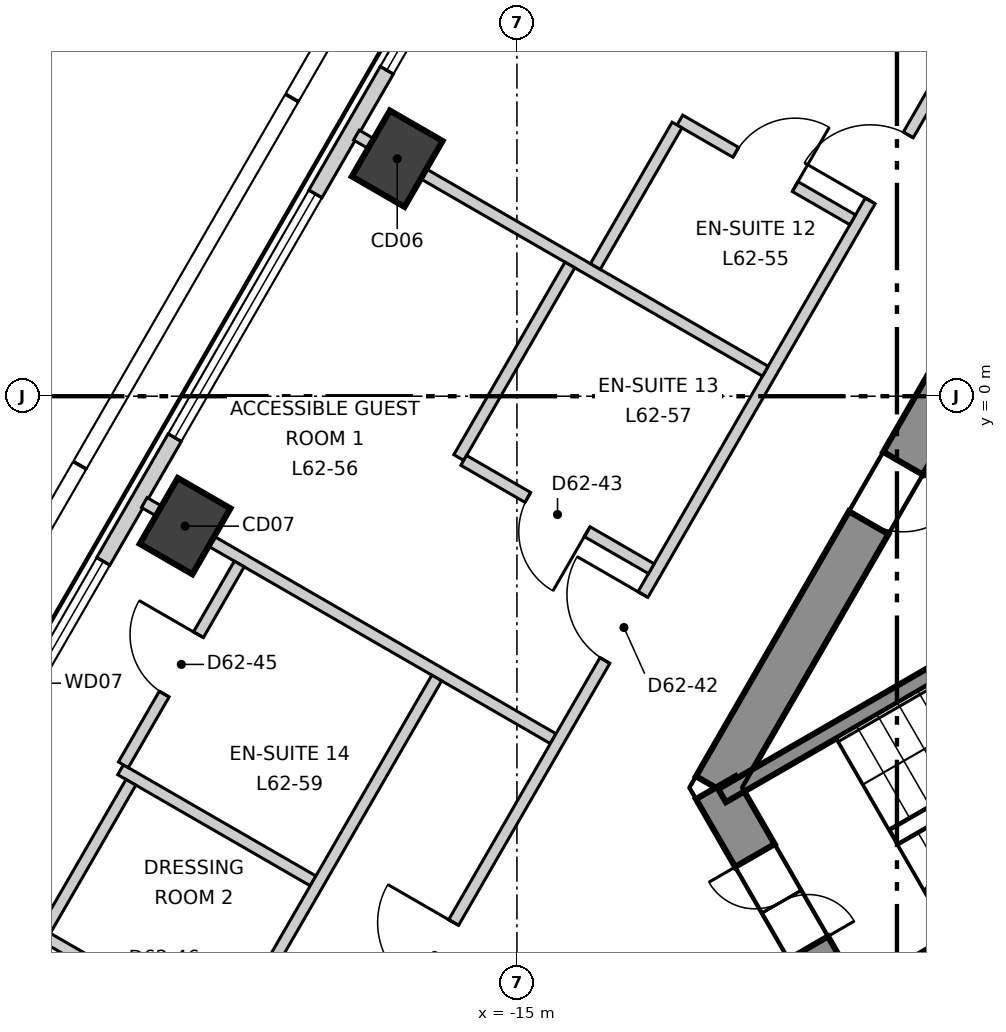
"""IFC4 building model, lengths in metres.
Left out: names, types, materials, properties, quantities, classifications, styles, units other than length and angle.
Written with IfcOpenShell. Run it as: python <this file> out.ifc"""

import sys

from ifc_helpers import new_model, si_unit, direction, frame, frame_2d, origin, origin_2d, place, context, subcontext, project, spatial, polyline, rectangle, outline, extrude, element, fill, save


model = new_model("IFC4")
c1 = context("Model", 3, precision=1e-05, world=origin(), true_north=direction((0.0, 1.0)))
c2 = subcontext(c1, "Body", "Model", "MODEL_VIEW")
j1 = project(units=[si_unit("LENGTHUNIT", "METRE"), si_unit("PLANEANGLEUNIT", "RADIAN")], contexts=[c1])
p1 = place(None, origin())
s1 = spatial("IfcSite", under=j1, at=p1, CompositionType="ELEMENT")
p2 = place(p1, origin())
s2 = spatial("IfcBuilding", under=s1, at=p2, CompositionType="ELEMENT")
p3 = place(p2, frame((0.0, 0.0, 268.3)))
s3 = spatial("IfcBuildingStorey", under=s2, at=p3, CompositionType="ELEMENT", Elevation=268.3)
p4 = place(p3, frame((-1.732, 13.3, -0.3), z_axis=(0.0, 0.0, 1.0), x_axis=(-0.500000539815, -0.866025092122, 0.0)))
e1 = element("IfcWall", 1, at=p4, inside=s3, PredefinedType="SHEAR", context=c2, shape_type="SweptSolid", body=[
    extrude(outline(polyline([(-0.173, -0.3), (1.795, -0.3), (3.763, -0.3), (5.732, -0.3), (7.7, -0.3), (9.668, -0.301), (11.637, -0.301), (13.605, -0.301), (15.573, -0.301), (17.542, -0.301), (19.51, -0.301), (21.478, -0.301), (21.131, 0.3), (19.226, 0.3), (17.321, 0.3), (15.415, 0.3), (13.51, 0.3), (11.605, 0.3), (9.699, 0.3), (7.794, 0.3), (5.889, 0.3), (3.984, 0.3), (2.078, 0.3), (0.173, 0.3), (-0.173, -0.3)])), origin(), (0.0, 0.0, 1.0), 3.6),
])
p5 = place(p4, frame((10.102, 0.0, 0.3)))
e2 = element("IfcOpeningElement", 2, at=p5, cuts=e1, PredefinedType="OPENING", context=c2, shape_type="SweptSolid", body=[
    extrude(rectangle(XDim=1.1, YDim=2.1, at=frame_2d((0.55, 1.05))), frame((0.0, 0.31, 0.0), z_axis=(0.0, -1.0, 0.0), x_axis=(1.0, 0.0, 0.0)), (0.0, 0.0, 1.0), 0.621),
])
p6 = place(p4, frame((16.378, 0.0, 0.3)))
e3 = element("IfcOpeningElement", 3, at=p6, cuts=e1, PredefinedType="OPENING", context=c2, shape_type="SweptSolid", body=[
    extrude(rectangle(XDim=0.9, YDim=2.1, at=frame_2d((0.45, 1.05))), frame((0.0, 0.31, 0.0), z_axis=(0.0, -1.0, 0.0), x_axis=(1.0, 0.0, 0.0)), (0.0, 0.0, 1.0), 0.621),
])
p7 = place(p4, frame((4.026, 0.0, 0.3)))
e4 = element("IfcOpeningElement", 4, at=p7, cuts=e1, PredefinedType="OPENING", context=c2, shape_type="SweptSolid", body=[
    extrude(rectangle(XDim=0.9, YDim=2.1, at=frame_2d((0.45, 1.05))), frame((0.0, 0.31, 0.0), z_axis=(0.0, -1.0, 0.0), x_axis=(1.0, 0.0, 0.0)), (0.0, 0.0, 1.0), 0.621),
])
p8 = place(p3, frame((-12.384, -5.15, -0.3), z_axis=(0.0, 0.0, 1.0), x_axis=(0.49997462182, -0.866040055388, 0.0)))
e5 = element("IfcWall", 5, at=p8, inside=s3, PredefinedType="SHEAR", context=c2, shape_type="SweptSolid", body=[
    extrude(outline(polyline([(-0.173, -0.301), (1.732, -0.301), (3.637, -0.3), (3.291, 0.3), (1.732, 0.3), (0.173, 0.3), (-0.173, -0.301)])), origin(), (0.0, 0.0, 1.0), 3.6),
])
p9 = place(p8, frame((1.032, 0.0, 0.3)))
e6 = element("IfcOpeningElement", 6, at=p9, cuts=e5, PredefinedType="OPENING", context=c2, shape_type="SweptSolid", body=[
    extrude(rectangle(XDim=1.4, YDim=2.1, at=frame_2d((0.7, 1.05))), frame((0.0, 0.31, 0.0), z_axis=(0.0, -1.0, 0.0), x_axis=(1.0, 0.0, 0.0)), (0.0, 0.0, 1.0), 0.621),
])
for number, where, z_axis, x_axis in (
    (7, (-16.575, 3.125, -0.3), (0.0, 0.0, 1.0), (0.5, 0.866, 0.0)),
    (8, (-19.366, -1.709, -0.3), (0.0, 0.0, 1.0), (0.5, 0.866, 0.0)),
):
    element("IfcColumn", number, at=place(p3, frame(where, z_axis=z_axis, x_axis=x_axis)), inside=s3, PredefinedType="COLUMN", context=c2, shape_type="SweptSolid", body=[
        extrude(rectangle(XDim=1.0, YDim=0.8, at=origin_2d()), origin(), (0.0, 0.0, 1.0), 3.6),
    ])
p10 = place(p3, frame((-2.577, 28.771, 0.0), z_axis=(0.0, 0.0, 1.0), x_axis=(-0.49999909388, -0.866025926932, 0.0)))
e9 = element("IfcWall", 9, at=p10, inside=s3, PredefinedType="ELEMENTEDWALL", context=c2, shape_type="SweptSolid", body=[
    extrude(rectangle(XDim=47.236, YDim=0.2, at=frame_2d((23.618, 0.0))), origin(), (0.0, 0.0, 1.0), 3.3),
])
p11 = place(p10, frame((2.243, 0.0, 0.9)))
e10 = element("IfcOpeningElement", 10, at=p11, cuts=e9, PredefinedType="OPENING", context=c2, shape_type="SweptSolid", body=[
    extrude(rectangle(XDim=3.7, YDim=2.2, at=frame_2d((1.85, 1.1))), frame((0.0, 0.11, 0.0), z_axis=(0.0, -1.0, 0.0), x_axis=(1.0, 0.0, 0.0)), (0.0, 0.0, 1.0), 0.22),
])
p12 = place(p10, frame((7.824, 0.0, 0.9)))
e11 = element("IfcOpeningElement", 11, at=p12, cuts=e9, PredefinedType="OPENING", context=c2, shape_type="SweptSolid", body=[
    extrude(rectangle(XDim=3.7, YDim=2.2, at=frame_2d((1.85, 1.1))), frame((0.0, 0.11, 0.0), z_axis=(0.0, -1.0, 0.0), x_axis=(1.0, 0.0, 0.0)), (0.0, 0.0, 1.0), 0.22),
])
p13 = place(p10, frame((13.406, 0.0, 0.9)))
e12 = element("IfcOpeningElement", 12, at=p13, cuts=e9, PredefinedType="OPENING", context=c2, shape_type="SweptSolid", body=[
    extrude(rectangle(XDim=3.7, YDim=2.2, at=frame_2d((1.85, 1.1))), frame((0.0, 0.11, 0.0), z_axis=(0.0, -1.0, 0.0), x_axis=(1.0, 0.0, 0.0)), (0.0, 0.0, 1.0), 0.22),
])
p14 = place(p10, frame((18.987, 0.0, 0.9)))
e13 = element("IfcOpeningElement", 13, at=p14, cuts=e9, PredefinedType="OPENING", context=c2, shape_type="SweptSolid", body=[
    extrude(rectangle(XDim=3.7, YDim=2.2, at=frame_2d((1.85, 1.1))), frame((0.0, 0.11, 0.0), z_axis=(0.0, -1.0, 0.0), x_axis=(1.0, 0.0, 0.0)), (0.0, 0.0, 1.0), 0.22),
])
p15 = place(p10, frame((24.569, 0.0, 0.9)))
e14 = element("IfcOpeningElement", 14, at=p15, cuts=e9, PredefinedType="OPENING", context=c2, shape_type="SweptSolid", body=[
    extrude(rectangle(XDim=3.7, YDim=2.2, at=frame_2d((1.85, 1.1))), frame((0.0, 0.11, 0.0), z_axis=(0.0, -1.0, 0.0), x_axis=(1.0, 0.0, 0.0)), (0.0, 0.0, 1.0), 0.22),
])
p16 = place(p10, frame((30.15, 0.0, 0.9)))
e15 = element("IfcOpeningElement", 15, at=p16, cuts=e9, PredefinedType="OPENING", context=c2, shape_type="SweptSolid", body=[
    extrude(rectangle(XDim=3.7, YDim=2.2, at=frame_2d((1.85, 1.1))), frame((0.0, 0.11, 0.0), z_axis=(0.0, -1.0, 0.0), x_axis=(1.0, 0.0, 0.0)), (0.0, 0.0, 1.0), 0.22),
])
p17 = place(p10, frame((35.731, 0.0, 0.9)))
e16 = element("IfcOpeningElement", 16, at=p17, cuts=e9, PredefinedType="OPENING", context=c2, shape_type="SweptSolid", body=[
    extrude(rectangle(XDim=3.7, YDim=2.2, at=frame_2d((1.85, 1.1))), frame((0.0, 0.11, 0.0), z_axis=(0.0, -1.0, 0.0), x_axis=(1.0, 0.0, 0.0)), (0.0, 0.0, 1.0), 0.22),
])
p18 = place(p10, frame((41.313, 0.0, 0.9)))
e17 = element("IfcOpeningElement", 17, at=p18, cuts=e9, PredefinedType="OPENING", context=c2, shape_type="SweptSolid", body=[
    extrude(rectangle(XDim=3.7, YDim=2.2, at=frame_2d((1.85, 1.1))), frame((0.0, 0.11, 0.0), z_axis=(0.0, -1.0, 0.0), x_axis=(1.0, 0.0, 0.0)), (0.0, 0.0, 1.0), 0.22),
])
p19 = place(p3, frame((-19.903, -1.399, 0.0), z_axis=(0.0, 0.0, 1.0), x_axis=(0.866043575568, -0.499968524226, 0.0)))
e18 = element("IfcWall", 18, at=p19, inside=s3, PredefinedType="PARTITIONING", context=c2, shape_type="SweptSolid", body=[
    extrude(rectangle(XDim=6.212, YDim=0.15, at=frame_2d((3.106, 0.0))), origin(), (0.0, 0.0, 1.0), 3.3),
])
p20 = place(p3, frame((-17.678, -10.12, 0.0), z_axis=(0.0, 0.0, 1.0), x_axis=(0.49998824015, 0.86603219323, 0.0)))
e19 = element("IfcWall", 19, at=p20, inside=s3, PredefinedType="PARTITIONING", context=c2, shape_type="SweptSolid", body=[
    extrude(rectangle(XDim=35.357, YDim=0.15, at=frame_2d((17.678, 0.0))), origin(), (0.0, 0.0, 1.0), 3.3),
])
p21 = place(p20, frame((31.607, 0.0, 0.0)))
e20 = element("IfcOpeningElement", 20, at=p21, cuts=e19, PredefinedType="OPENING", context=c2, shape_type="SweptSolid", body=[
    extrude(rectangle(XDim=1.0, YDim=2.1, at=frame_2d((0.5, 1.05))), frame((0.0, 0.085, 0.0), z_axis=(0.0, -1.0, 0.0), x_axis=(1.0, 0.0, 0.0)), (0.0, 0.0, 1.0), 0.17),
])
p22 = place(p20, frame((19.416, 0.0, 0.0)))
e21 = element("IfcOpeningElement", 21, at=p22, cuts=e19, PredefinedType="OPENING", context=c2, shape_type="SweptSolid", body=[
    extrude(rectangle(XDim=1.0, YDim=2.1, at=frame_2d((0.5, 1.05))), frame((0.0, 0.085, 0.0), z_axis=(0.0, -1.0, 0.0), x_axis=(1.0, 0.0, 0.0)), (0.0, 0.0, 1.0), 0.17),
])
p23 = place(p20, frame((24.916, 0.0, 0.0)))
e22 = element("IfcOpeningElement", 22, at=p23, cuts=e19, PredefinedType="OPENING", context=c2, shape_type="SweptSolid", body=[
    extrude(rectangle(XDim=0.9, YDim=2.1, at=frame_2d((0.45, 1.05))), frame((0.0, 0.085, 0.0), z_axis=(0.0, -1.0, 0.0), x_axis=(1.0, 0.0, 0.0)), (0.0, 0.0, 1.0), 0.17),
])
p24 = place(p20, frame((22.816, 0.0, 0.0)))
e23 = element("IfcOpeningElement", 23, at=p24, cuts=e19, PredefinedType="OPENING", context=c2, shape_type="SweptSolid", body=[
    extrude(rectangle(XDim=0.9, YDim=2.1, at=frame_2d((0.45, 1.05))), frame((0.0, 0.085, 0.0), z_axis=(0.0, -1.0, 0.0), x_axis=(1.0, 0.0, 0.0)), (0.0, 0.0, 1.0), 0.17),
])
p25 = place(p20, frame((14.654, 0.0, 0.0)))
e24 = element("IfcOpeningElement", 24, at=p25, cuts=e19, PredefinedType="OPENING", context=c2, shape_type="SweptSolid", body=[
    extrude(rectangle(XDim=1.0, YDim=2.1, at=frame_2d((0.5, 1.05))), frame((0.0, 0.085, 0.0), z_axis=(0.0, -1.0, 0.0), x_axis=(1.0, 0.0, 0.0)), (0.0, 0.0, 1.0), 0.17),
])
p26 = place(p20, frame((7.672, 0.0, 0.0)))
e25 = element("IfcOpeningElement", 25, at=p26, cuts=e19, PredefinedType="OPENING", context=c2, shape_type="SweptSolid", body=[
    extrude(rectangle(XDim=1.0, YDim=2.1, at=frame_2d((0.5, 1.05))), frame((0.0, 0.085, 0.0), z_axis=(0.0, -1.0, 0.0), x_axis=(1.0, 0.0, 0.0)), (0.0, 0.0, 1.0), 0.17),
])
p27 = place(p20, frame((2.69, 0.0, 0.0)))
e26 = element("IfcOpeningElement", 26, at=p27, cuts=e19, PredefinedType="OPENING", context=c2, shape_type="SweptSolid", body=[
    extrude(rectangle(XDim=1.0, YDim=2.1, at=frame_2d((0.5, 1.05))), frame((0.0, 0.085, 0.0), z_axis=(0.0, -1.0, 0.0), x_axis=(1.0, 0.0, 0.0)), (0.0, 0.0, 1.0), 0.17),
])
p28 = place(p3, frame((-17.112, 3.435, 0.0), z_axis=(0.0, 0.0, 1.0), x_axis=(0.866043575568, -0.499968524226, 0.0)))
e27 = element("IfcWall", 27, at=p28, inside=s3, PredefinedType="PARTITIONING", context=c2, shape_type="SweptSolid", body=[
    extrude(rectangle(XDim=6.212, YDim=0.15, at=frame_2d((3.106, 0.0))), origin(), (0.0, 0.0, 1.0), 3.3),
])
p29 = place(p3, frame((-20.215, -4.914, 0.0), z_axis=(0.0, 0.0, 1.0), x_axis=(0.866118873815, -0.499838070201, 0.0)))
e28 = element("IfcWall", 28, at=p29, inside=s3, PredefinedType="PARTITIONING", context=c2, shape_type="SweptSolid", body=[
    extrude(rectangle(XDim=2.925, YDim=0.15, at=frame_2d((1.462, 0.0))), origin(), (0.0, 0.0, 1.0), 3.3),
])
p30 = place(p3, frame((-21.242, -7.092, 0.0), z_axis=(0.0, 0.0, 1.0), x_axis=(0.500216356891, 0.865900454035, 0.0)))
e29 = element("IfcWall", 29, at=p30, inside=s3, PredefinedType="PARTITIONING", context=c2, shape_type="SweptSolid", body=[
    extrude(rectangle(XDim=2.325, YDim=0.15, at=frame_2d((1.162, 0.0))), origin(), (0.0, 0.0, 1.0), 3.3),
])
p31 = place(p3, frame((-21.177, -7.13, 0.0), z_axis=(0.0, 0.0, 1.0), x_axis=(0.866112488944, -0.499849133735, 0.0)))
e30 = element("IfcWall", 30, at=p31, inside=s3, PredefinedType="PARTITIONING", context=c2, shape_type="SweptSolid", body=[
    extrude(rectangle(XDim=2.725, YDim=0.15, at=frame_2d((1.362, 0.0))), origin(), (0.0, 0.0, 1.0), 3.3),
])
p32 = place(p31, frame((0.875, 0.0, 0.0)))
e31 = element("IfcOpeningElement", 31, at=p32, cuts=e30, PredefinedType="OPENING", context=c2, shape_type="SweptSolid", body=[
    extrude(rectangle(XDim=0.9, YDim=2.1, at=frame_2d((0.45, 1.05))), frame((0.0, 0.085, 0.0), z_axis=(0.0, -1.0, 0.0), x_axis=(1.0, 0.0, 0.0)), (0.0, 0.0, 1.0), 0.17),
])
p33 = place(p3, frame((-18.78, -8.427, 0.0), z_axis=(0.0, 0.0, 1.0), x_axis=(0.500002931134, 0.866023711487, 0.0)))
e32 = element("IfcWall", 32, at=p33, inside=s3, PredefinedType="PARTITIONING", context=c2, shape_type="SweptSolid", body=[
    extrude(rectangle(XDim=5.45, YDim=0.15, at=frame_2d((2.725, 0.0))), origin(), (0.0, 0.0, 1.0), 3.3),
])
p34 = place(p3, frame((-20.178, -4.849, 0.0), z_axis=(0.0, 0.0, 1.0), x_axis=(0.499874869213, 0.866097636026, 0.0)))
e33 = element("IfcWall", 33, at=p34, inside=s3, PredefinedType="PARTITIONING", context=c2, shape_type="SweptSolid", body=[
    extrude(rectangle(XDim=3.051, YDim=0.15, at=frame_2d((1.525, 0.0))), origin(), (0.0, 0.0, 1.0), 3.3),
])
p35 = place(p34, frame((1.075, 0.0, 0.0)))
e34 = element("IfcOpeningElement", 34, at=p35, cuts=e33, PredefinedType="OPENING", context=c2, shape_type="SweptSolid", body=[
    extrude(rectangle(XDim=0.9, YDim=2.1, at=frame_2d((0.45, 1.05))), frame((0.0, 0.085, 0.0), z_axis=(0.0, -1.0, 0.0), x_axis=(1.0, 0.0, 0.0)), (0.0, 0.0, 1.0), 0.17),
])
p36 = place(p3, frame((-12.856, 3.633, 0.0), z_axis=(0.0, 0.0, 1.0), x_axis=(0.866163910271, -0.499760022954, 0.0)))
e35 = element("IfcWall", 35, at=p36, inside=s3, PredefinedType="PARTITIONING", context=c2, shape_type="SweptSolid", body=[
    extrude(rectangle(XDim=2.625, YDim=0.15, at=frame_2d((1.312, 0.0))), origin(), (0.0, 0.0, 1.0), 3.3),
])
p37 = place(p36, frame((0.85, 0.0, 0.0)))
e36 = element("IfcOpeningElement", 36, at=p37, cuts=e35, PredefinedType="OPENING", context=c2, shape_type="SweptSolid", body=[
    extrude(rectangle(XDim=0.9, YDim=2.1, at=frame_2d((0.45, 1.05))), frame((0.0, 0.085, 0.0), z_axis=(0.0, -1.0, 0.0), x_axis=(1.0, 0.0, 0.0)), (0.0, 0.0, 1.0), 0.17),
])
p38 = place(p3, frame((-13.968, 1.707, 0.0), z_axis=(0.0, 0.0, 1.0), x_axis=(0.500158362642, 0.865933953763, 0.0)))
e37 = element("IfcWall", 37, at=p38, inside=s3, PredefinedType="PARTITIONING", context=c2, shape_type="SweptSolid", body=[
    extrude(rectangle(XDim=2.149, YDim=0.15, at=frame_2d((1.075, 0.0))), origin(), (0.0, 0.0, 1.0), 3.3),
])
p39 = place(p3, frame((-15.765, -0.807, 0.0), z_axis=(0.0, 0.0, 1.0), x_axis=(0.499729678228, 0.86618141789, 0.0)))
e38 = element("IfcWall", 38, at=p39, inside=s3, PredefinedType="PARTITIONING", context=c2, shape_type="SweptSolid", body=[
    extrude(rectangle(XDim=2.925, YDim=0.15, at=frame_2d((1.463, 0.0))), origin(), (0.0, 0.0, 1.0), 3.3),
])
p40 = place(p3, frame((-15.7, -0.844, 0.0), z_axis=(0.0, 0.0, 1.0), x_axis=(0.866004402611, -0.500036373335, 0.0)))
e39 = element("IfcWall", 39, at=p40, inside=s3, PredefinedType="PARTITIONING", context=c2, shape_type="SweptSolid", body=[
    extrude(rectangle(XDim=2.85, YDim=0.15, at=frame_2d((1.425, 0.0))), origin(), (0.0, 0.0, 1.0), 3.3),
])
p41 = place(p40, frame((0.975, 0.0, 0.0)))
e40 = element("IfcOpeningElement", 40, at=p41, cuts=e39, PredefinedType="OPENING", context=c2, shape_type="SweptSolid", body=[
    extrude(rectangle(XDim=0.9, YDim=2.1, at=frame_2d((0.45, 1.05))), frame((0.0, 0.085, 0.0), z_axis=(0.0, -1.0, 0.0), x_axis=(1.0, 0.0, 0.0)), (0.0, 0.0, 1.0), 0.17),
])
p42 = place(p3, frame((-12.301, -5.254, 0.0), z_axis=(0.0, 0.0, 1.0), x_axis=(0.866068467981, 0.499925403204, 0.0)))
e41 = element("IfcWall", 41, at=p42, inside=s3, PredefinedType="SOLIDWALL", context=c2, shape_type="SweptSolid", body=[
    extrude(rectangle(XDim=6.665, YDim=0.2, at=frame_2d((3.332, 0.0))), origin(), (0.0, 0.0, 1.0), 3.3),
])
p43 = place(p3, frame((-10.701, -8.026, 0.0), z_axis=(0.0, 0.0, 1.0), x_axis=(0.866005022404, 0.500035299925, 0.0)))
e42 = element("IfcWall", 42, at=p43, inside=s3, PredefinedType="SOLIDWALL", context=c2, shape_type="SweptSolid", body=[
    extrude(rectangle(XDim=6.665, YDim=0.2, at=frame_2d((3.333, 0.0))), origin(), (0.0, 0.0, 1.0), 3.3),
])
p44 = place(p15, origin())
e43 = element("IfcWindow", 43, at=p44, inside=s3, PartitioningType="SINGLE_PANEL", PredefinedType="WINDOW", context=c2, shape_type="SweptSolid", body=[
    extrude(rectangle(XDim=3.7, YDim=2.2, at=frame_2d((1.85, 1.1))), frame((0.0, 0.03, 0.0), z_axis=(0.0, -1.0, 0.0), x_axis=(1.0, 0.0, 0.0)), (0.0, 0.0, 1.0), 0.06),
])
fill(e14, e43)
p45 = place(p16, origin())
e44 = element("IfcWindow", 44, at=p45, inside=s3, PartitioningType="SINGLE_PANEL", PredefinedType="WINDOW", context=c2, shape_type="SweptSolid", body=[
    extrude(rectangle(XDim=3.7, YDim=2.2, at=frame_2d((1.85, 1.1))), frame((0.0, 0.03, 0.0), z_axis=(0.0, -1.0, 0.0), x_axis=(1.0, 0.0, 0.0)), (0.0, 0.0, 1.0), 0.06),
])
fill(e15, e44)
p46 = place(p17, origin())
e45 = element("IfcWindow", 45, at=p46, inside=s3, PartitioningType="SINGLE_PANEL", PredefinedType="WINDOW", context=c2, shape_type="SweptSolid", body=[
    extrude(rectangle(XDim=3.7, YDim=2.2, at=frame_2d((1.85, 1.1))), frame((0.0, 0.03, 0.0), z_axis=(0.0, -1.0, 0.0), x_axis=(1.0, 0.0, 0.0)), (0.0, 0.0, 1.0), 0.06),
])
fill(e16, e45)
p47 = place(p25, origin())
e46 = element("IfcDoor", 46, at=p47, inside=s3, OperationType="SINGLE_SWING_RIGHT", PredefinedType="DOOR", context=c2, shape_type="SweptSolid", body=[
    extrude(rectangle(XDim=1.0, YDim=2.1, at=frame_2d((0.5, 1.05))), frame((0.0, 0.025, 0.0), z_axis=(0.0, -1.0, 0.0), x_axis=(1.0, 0.0, 0.0)), (0.0, 0.0, 1.0), 0.05),
])
fill(e24, e46)
p48 = place(p37, origin())
e47 = element("IfcDoor", 47, at=p48, inside=s3, OperationType="SINGLE_SWING_LEFT", PredefinedType="DOOR", context=c2, shape_type="SweptSolid", body=[
    extrude(rectangle(XDim=0.9, YDim=2.1, at=frame_2d((0.45, 1.05))), frame((0.0, 0.025, 0.0), z_axis=(0.0, -1.0, 0.0), x_axis=(1.0, 0.0, 0.0)), (0.0, 0.0, 1.0), 0.05),
])
fill(e36, e47)
p49 = place(p26, origin())
e48 = element("IfcDoor", 48, at=p49, inside=s3, OperationType="SINGLE_SWING_LEFT", PredefinedType="DOOR", context=c2, shape_type="SweptSolid", body=[
    extrude(rectangle(XDim=1.0, YDim=2.1, at=frame_2d((0.5, 1.05))), frame((0.0, 0.025, 0.0), z_axis=(0.0, -1.0, 0.0), x_axis=(1.0, 0.0, 0.0)), (0.0, 0.0, 1.0), 0.05),
])
fill(e25, e48)
p50 = place(p41, origin())
e49 = element("IfcDoor", 49, at=p50, inside=s3, OperationType="SINGLE_SWING_RIGHT", PredefinedType="DOOR", context=c2, shape_type="SweptSolid", body=[
    extrude(rectangle(XDim=0.9, YDim=2.1, at=frame_2d((0.45, 1.05))), frame((0.0, 0.025, 0.0), z_axis=(0.0, -1.0, 0.0), x_axis=(1.0, 0.0, 0.0)), (0.0, 0.0, 1.0), 0.05),
])
fill(e40, e49)
p51 = place(p27, origin())
e50 = element("IfcDoor", 50, at=p51, inside=s3, OperationType="SINGLE_SWING_LEFT", PredefinedType="DOOR", context=c2, shape_type="SweptSolid", body=[
    extrude(rectangle(XDim=1.0, YDim=2.1, at=frame_2d((0.5, 1.05))), frame((0.0, 0.025, 0.0), z_axis=(0.0, -1.0, 0.0), x_axis=(1.0, 0.0, 0.0)), (0.0, 0.0, 1.0), 0.05),
])
fill(e26, e50)
p52 = place(p35, origin())
e51 = element("IfcDoor", 51, at=p52, inside=s3, OperationType="SINGLE_SWING_LEFT", PredefinedType="DOOR", context=c2, shape_type="SweptSolid", body=[
    extrude(rectangle(XDim=0.9, YDim=2.1, at=frame_2d((0.45, 1.05))), frame((0.0, 0.025, 0.0), z_axis=(0.0, -1.0, 0.0), x_axis=(1.0, 0.0, 0.0)), (0.0, 0.0, 1.0), 0.05),
])
fill(e34, e51)
p53 = place(p9, origin())
e52 = element("IfcDoor", 52, at=p53, inside=s3, OperationType="DOUBLE_DOOR_SINGLE_SWING", PredefinedType="DOOR", context=c2, shape_type="SweptSolid", body=[
    extrude(rectangle(XDim=1.4, YDim=2.1, at=frame_2d((0.7, 1.05))), frame((0.0, 0.025, 0.0), z_axis=(0.0, -1.0, 0.0), x_axis=(1.0, 0.0, 0.0)), (0.0, 0.0, 1.0), 0.05),
])
fill(e6, e52)
p54 = place(p6, origin())
e53 = element("IfcDoor", 53, at=p54, inside=s3, OperationType="SINGLE_SWING_RIGHT", PredefinedType="DOOR", context=c2, shape_type="SweptSolid", body=[
    extrude(rectangle(XDim=0.9, YDim=2.1, at=frame_2d((0.45, 1.05))), frame((0.0, 0.025, 0.0), z_axis=(0.0, -1.0, 0.0), x_axis=(1.0, 0.0, 0.0)), (0.0, 0.0, 1.0), 0.05),
])
fill(e3, e53)
save(model, sys.argv[1])
